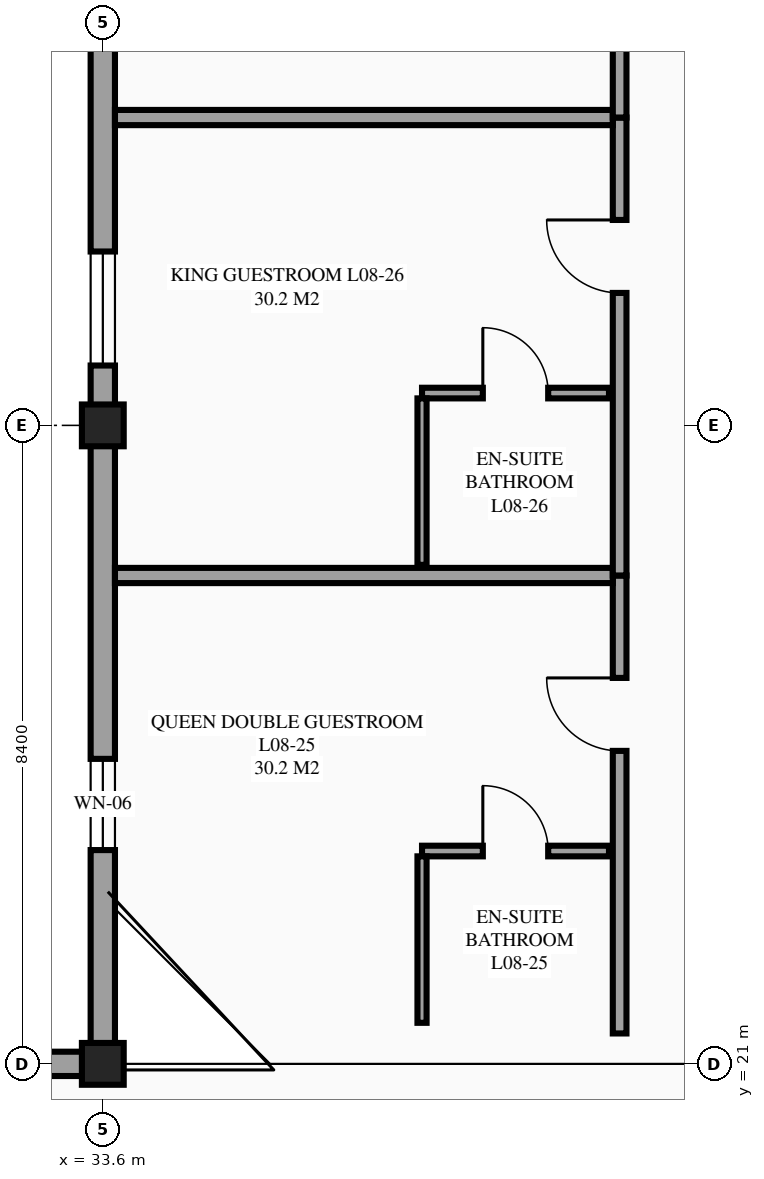
"""IFC4 building model, lengths in metres.
Left out: names, types, materials, properties, quantities, classifications, styles, units other than length and angle.
Written with IfcOpenShell. Run it as: python <this file> out.ifc"""

import sys

from ifc_helpers import new_model, si_unit, direction, frame, frame_2d, origin, origin_2d, place, context, subcontext, project, spatial, rectangle, extrude, element, fill, save


model = new_model("IFC4")
c1 = context("Model", 3, precision=1e-05, world=origin(), true_north=direction((0.0, 1.0)))
c2 = subcontext(c1, "Body", "Model", "MODEL_VIEW")
j1 = project(units=[si_unit("LENGTHUNIT", "METRE"), si_unit("PLANEANGLEUNIT", "RADIAN")], contexts=[c1])
p1 = place(None, origin())
s1 = spatial("IfcSite", under=j1, at=p1, CompositionType="ELEMENT")
p2 = place(p1, origin())
s2 = spatial("IfcBuilding", under=s1, at=p2, CompositionType="ELEMENT")
p3 = place(p2, frame((0.0, 0.0, 32.7)))
s3 = spatial("IfcBuildingStorey", under=s2, at=p3, CompositionType="ELEMENT", Elevation=32.7)
for number, where, z_axis, x_axis in (
    (1, (33.6, 21.0, 0.0), (0.0, 0.0, 1.0), (1.0, 0.0, 0.0)),
    (2, (33.6, 29.4, 0.0), (0.0, 0.0, 1.0), (1.0, 0.0, 0.0)),
):
    element("IfcColumn", number, at=place(p3, frame(where, z_axis=z_axis, x_axis=x_axis)), inside=s3, PredefinedType="COLUMN", context=c2, shape_type="SweptSolid", body=[
        extrude(rectangle(XDim=0.55, YDim=0.55, at=origin_2d()), origin(), (0.0, 0.0, 1.0), 3.6),
    ])
p4 = place(p3, frame((33.6, 37.8, 0.0), z_axis=(0.0, 0.0, 1.0), x_axis=(0.0, -1.0, 0.0)))
e3 = element("IfcWall", 3, at=p4, inside=s3, PredefinedType="STANDARD", context=c2, shape_type="SweptSolid", body=[
    extrude(rectangle(XDim=16.8, YDim=0.32, at=frame_2d((8.4, 0.0))), origin(), (0.0, 0.0, 1.0), 2.63),
])
p5 = place(p4, frame((12.788, 0.0, 0.85)))
e4 = element("IfcOpeningElement", 4, at=p5, cuts=e3, PredefinedType="OPENING", context=c2, shape_type="SweptSolid", body=[
    extrude(rectangle(XDim=1.2, YDim=1.5, at=frame_2d((0.6, 0.75))), frame((0.0, 0.17, 0.0), z_axis=(0.0, -1.0, 0.0), x_axis=(1.0, 0.0, 0.0)), (0.0, 0.0, 1.0), 0.34),
])
p6 = place(p4, frame((6.113, 0.0, 0.85)))
e5 = element("IfcOpeningElement", 5, at=p6, cuts=e3, PredefinedType="OPENING", context=c2, shape_type="SweptSolid", body=[
    extrude(rectangle(XDim=1.5, YDim=1.5, at=frame_2d((0.75, 0.75))), frame((0.0, 0.17, 0.0), z_axis=(0.0, -1.0, 0.0), x_axis=(1.0, 0.0, 0.0)), (0.0, 0.0, 1.0), 0.34),
])
p7 = place(p4, frame((0.837, 0.0, 0.85)))
e6 = element("IfcOpeningElement", 6, at=p7, cuts=e3, PredefinedType="OPENING", context=c2, shape_type="SweptSolid", body=[
    extrude(rectangle(XDim=1.5, YDim=1.5, at=frame_2d((0.75, 0.75))), frame((0.0, 0.17, 0.0), z_axis=(0.0, -1.0, 0.0), x_axis=(1.0, 0.0, 0.0)), (0.0, 0.0, 1.0), 0.34),
])
p8 = place(p3, frame((33.6, 21.0, 0.0), z_axis=(0.0, 0.0, 1.0), x_axis=(-1.0, 0.0, 0.0)))
e7 = element("IfcWall", 7, at=p8, inside=s3, PredefinedType="STANDARD", context=c2, shape_type="SweptSolid", body=[
    extrude(rectangle(XDim=2.0, YDim=0.32, at=frame_2d((1.0, 0.0))), origin(), (0.0, 0.0, 1.0), 2.53),
])
p9 = place(p3, frame((40.4, 21.4, 0.0), z_axis=(0.0, 0.0, 1.0), x_axis=(0.0, 1.0, 0.0)))
e8 = element("IfcWall", 8, at=p9, inside=s3, PredefinedType="PARTITIONING", context=c2, shape_type="SweptSolid", body=[
    extrude(rectangle(XDim=6.025, YDim=0.18, at=frame_2d((3.013, 0.0))), origin(), (0.0, 0.0, 1.0), 3.375),
])
p10 = place(p9, frame((3.718, 0.0, 0.0)))
e9 = element("IfcOpeningElement", 9, at=p10, cuts=e8, PredefinedType="OPENING", context=c2, shape_type="SweptSolid", body=[
    extrude(rectangle(XDim=0.96, YDim=2.15, at=frame_2d((0.48, 1.075))), frame((0.0, 0.1, 0.0), z_axis=(0.0, -1.0, 0.0), x_axis=(1.0, 0.0, 0.0)), (0.0, 0.0, 1.0), 0.2),
])
p11 = place(p3, frame((33.76, 27.425, 0.0), z_axis=(0.0, 0.0, 1.0), x_axis=(1.0, 0.0, 0.0)))
e10 = element("IfcWall", 10, at=p11, inside=s3, PredefinedType="PARTITIONING", context=c2, shape_type="SweptSolid", body=[
    extrude(rectangle(XDim=6.55, YDim=0.2, at=frame_2d((3.275, 0.0))), origin(), (0.0, 0.0, 1.0), 3.375),
])
p12 = place(p3, frame((37.8, 23.8, 0.0), z_axis=(0.0, 0.0, 1.0), x_axis=(1.0, 0.0, 0.0)))
e11 = element("IfcWall", 11, at=p12, inside=s3, PredefinedType="PARTITIONING", context=c2, shape_type="SweptSolid", body=[
    extrude(rectangle(XDim=2.46, YDim=0.14, at=frame_2d((1.23, 0.0))), origin(), (0.0, 0.0, 1.0), 3.375),
])
p13 = place(p12, frame((0.8, 0.0, 0.0)))
e12 = element("IfcOpeningElement", 12, at=p13, cuts=e11, PredefinedType="OPENING", context=c2, shape_type="SweptSolid", body=[
    extrude(rectangle(XDim=0.86, YDim=2.1, at=frame_2d((0.43, 1.05))), frame((0.0, 0.08, 0.0), z_axis=(0.0, -1.0, 0.0), x_axis=(1.0, 0.0, 0.0)), (0.0, 0.0, 1.0), 0.16),
])
p14 = place(p3, frame((37.8, 21.54, 0.0), z_axis=(0.0, 0.0, 1.0), x_axis=(0.0, 1.0, 0.0)))
e13 = element("IfcWall", 13, at=p14, inside=s3, PredefinedType="PARTITIONING", context=c2, shape_type="SweptSolid", body=[
    extrude(rectangle(XDim=2.19, YDim=0.12, at=frame_2d((1.095, 0.0))), origin(), (0.0, 0.0, 1.0), 3.375),
])
p15 = place(p3, frame((40.4, 27.425, 0.0), z_axis=(0.0, 0.0, 1.0), x_axis=(0.0, 1.0, 0.0)))
e14 = element("IfcWall", 14, at=p15, inside=s3, PredefinedType="PARTITIONING", context=c2, shape_type="SweptSolid", body=[
    extrude(rectangle(XDim=6.025, YDim=0.18, at=frame_2d((3.012, 0.0))), origin(), (0.0, 0.0, 1.0), 3.375),
])
p16 = place(p15, frame((3.718, 0.0, 0.0)))
e15 = element("IfcOpeningElement", 15, at=p16, cuts=e14, PredefinedType="OPENING", context=c2, shape_type="SweptSolid", body=[
    extrude(rectangle(XDim=0.96, YDim=2.15, at=frame_2d((0.48, 1.075))), frame((0.0, 0.1, 0.0), z_axis=(0.0, -1.0, 0.0), x_axis=(1.0, 0.0, 0.0)), (0.0, 0.0, 1.0), 0.2),
])
p17 = place(p3, frame((33.76, 33.45, 0.0), z_axis=(0.0, 0.0, 1.0), x_axis=(1.0, 0.0, 0.0)))
e16 = element("IfcWall", 16, at=p17, inside=s3, PredefinedType="PARTITIONING", context=c2, shape_type="SweptSolid", body=[
    extrude(rectangle(XDim=6.55, YDim=0.2, at=frame_2d((3.275, 0.0))), origin(), (0.0, 0.0, 1.0), 3.375),
])
p18 = place(p3, frame((37.8, 29.825, 0.0), z_axis=(0.0, 0.0, 1.0), x_axis=(1.0, 0.0, 0.0)))
e17 = element("IfcWall", 17, at=p18, inside=s3, PredefinedType="PARTITIONING", context=c2, shape_type="SweptSolid", body=[
    extrude(rectangle(XDim=2.46, YDim=0.14, at=frame_2d((1.23, 0.0))), origin(), (0.0, 0.0, 1.0), 3.375),
])
p19 = place(p18, frame((0.8, 0.0, 0.0)))
e18 = element("IfcOpeningElement", 18, at=p19, cuts=e17, PredefinedType="OPENING", context=c2, shape_type="SweptSolid", body=[
    extrude(rectangle(XDim=0.86, YDim=2.1, at=frame_2d((0.43, 1.05))), frame((0.0, 0.08, 0.0), z_axis=(0.0, -1.0, 0.0), x_axis=(1.0, 0.0, 0.0)), (0.0, 0.0, 1.0), 0.16),
])
p20 = place(p3, frame((37.8, 27.565, 0.0), z_axis=(0.0, 0.0, 1.0), x_axis=(0.0, 1.0, 0.0)))
e19 = element("IfcWall", 19, at=p20, inside=s3, PredefinedType="PARTITIONING", context=c2, shape_type="SweptSolid", body=[
    extrude(rectangle(XDim=2.19, YDim=0.12, at=frame_2d((1.095, 0.0))), origin(), (0.0, 0.0, 1.0), 3.375),
])
p21 = place(p3, frame((40.4, 33.45, 0.0), z_axis=(0.0, 0.0, 1.0), x_axis=(0.0, 1.0, 0.0)))
e20 = element("IfcWall", 20, at=p21, inside=s3, PredefinedType="PARTITIONING", context=c2, shape_type="SweptSolid", body=[
    extrude(rectangle(XDim=6.025, YDim=0.18, at=frame_2d((3.013, 0.0))), origin(), (0.0, 0.0, 1.0), 3.375),
])
p22 = place(p21, frame((1.347, 0.0, 0.0)))
e21 = element("IfcOpeningElement", 21, at=p22, cuts=e20, PredefinedType="OPENING", context=c2, shape_type="SweptSolid", body=[
    extrude(rectangle(XDim=0.96, YDim=2.15, at=frame_2d((0.48, 1.075))), frame((0.0, 0.1, 0.0), z_axis=(0.0, -1.0, 0.0), x_axis=(1.0, 0.0, 0.0)), (0.0, 0.0, 1.0), 0.2),
])
p23 = place(p5, origin())
e22 = element("IfcWindow", 22, at=p23, inside=s3, PartitioningType="SINGLE_PANEL", PredefinedType="WINDOW", context=c2, shape_type="SweptSolid", body=[
    extrude(rectangle(XDim=1.2, YDim=1.5, at=frame_2d((0.6, 0.75))), frame((0.0, 0.03, 0.0), z_axis=(0.0, -1.0, 0.0), x_axis=(1.0, 0.0, 0.0)), (0.0, 0.0, 1.0), 0.06),
])
fill(e4, e22)
p24 = place(p6, origin())
e23 = element("IfcWindow", 23, at=p24, inside=s3, PartitioningType="SINGLE_PANEL", PredefinedType="WINDOW", context=c2, shape_type="SweptSolid", body=[
    extrude(rectangle(XDim=1.5, YDim=1.5, at=frame_2d((0.75, 0.75))), frame((0.0, 0.03, 0.0), z_axis=(0.0, -1.0, 0.0), x_axis=(1.0, 0.0, 0.0)), (0.0, 0.0, 1.0), 0.06),
])
fill(e5, e23)
p25 = place(p10, origin())
e24 = element("IfcDoor", 24, at=p25, inside=s3, OperationType="SINGLE_SWING_RIGHT", PredefinedType="DOOR", context=c2, shape_type="SweptSolid", body=[
    extrude(rectangle(XDim=0.96, YDim=2.15, at=frame_2d((0.48, 1.075))), frame((0.0, 0.025, 0.0), z_axis=(0.0, -1.0, 0.0), x_axis=(1.0, 0.0, 0.0)), (0.0, 0.0, 1.0), 0.05),
])
fill(e9, e24)
p26 = place(p13, origin())
e25 = element("IfcDoor", 25, at=p26, inside=s3, OperationType="SINGLE_SWING_LEFT", PredefinedType="DOOR", context=c2, shape_type="SweptSolid", body=[
    extrude(rectangle(XDim=0.86, YDim=2.1, at=frame_2d((0.43, 1.05))), frame((0.0, 0.025, 0.0), z_axis=(0.0, -1.0, 0.0), x_axis=(1.0, 0.0, 0.0)), (0.0, 0.0, 1.0), 0.05),
])
fill(e12, e25)
p27 = place(p16, origin())
e26 = element("IfcDoor", 26, at=p27, inside=s3, OperationType="SINGLE_SWING_RIGHT", PredefinedType="DOOR", context=c2, shape_type="SweptSolid", body=[
    extrude(rectangle(XDim=0.96, YDim=2.15, at=frame_2d((0.48, 1.075))), frame((0.0, 0.025, 0.0), z_axis=(0.0, -1.0, 0.0), x_axis=(1.0, 0.0, 0.0)), (0.0, 0.0, 1.0), 0.05),
])
fill(e15, e26)
p28 = place(p19, origin())
e27 = element("IfcDoor", 27, at=p28, inside=s3, OperationType="SINGLE_SWING_LEFT", PredefinedType="DOOR", context=c2, shape_type="SweptSolid", body=[
    extrude(rectangle(XDim=0.86, YDim=2.1, at=frame_2d((0.43, 1.05))), frame((0.0, 0.025, 0.0), z_axis=(0.0, -1.0, 0.0), x_axis=(1.0, 0.0, 0.0)), (0.0, 0.0, 1.0), 0.05),
])
fill(e18, e27)
save(model, sys.argv[1])
